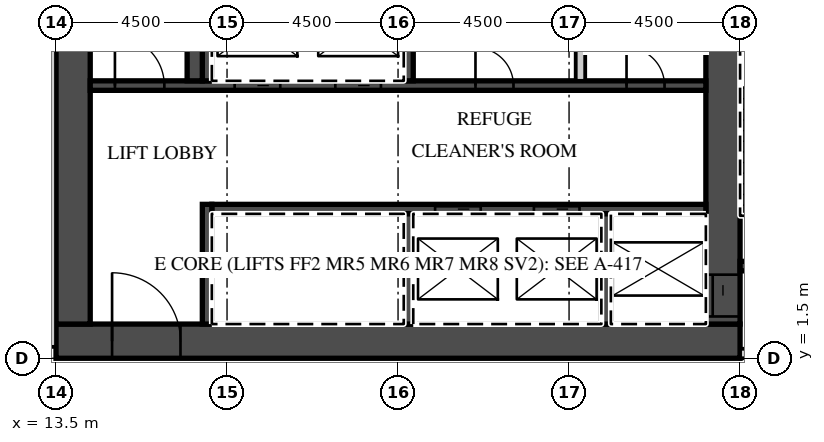
"""IFC4 building model, lengths in metres.
Left out: names, types, materials, properties, quantities, classifications, styles, units other than length and angle.
Written with IfcOpenShell. Run it as: python <this file> out.ifc"""

import sys

from ifc_helpers import new_model, si_unit, direction, frame, frame_2d, origin, place, context, subcontext, project, spatial, rectangle, extrude, element, fill, save


model = new_model("IFC4")
c1 = context("Model", 3, precision=1e-05, world=origin(), true_north=direction((0.0, 1.0)))
c2 = subcontext(c1, "Body", "Model", "MODEL_VIEW")
j1 = project(units=[si_unit("LENGTHUNIT", "METRE"), si_unit("PLANEANGLEUNIT", "RADIAN")], contexts=[c1])
p1 = place(None, origin())
s1 = spatial("IfcSite", under=j1, at=p1, CompositionType="ELEMENT")
p2 = place(p1, origin())
s2 = spatial("IfcBuilding", under=s1, at=p2, CompositionType="ELEMENT")
p3 = place(p2, frame((0.0, 0.0, 257.3)))
s3 = spatial("IfcBuildingStorey", under=s2, at=p3, CompositionType="ELEMENT", Elevation=257.3)
p4 = place(p3, frame((13.5, 1.95, 0.0), z_axis=(0.0, 0.0, 1.0), x_axis=(1.0, 0.0, 0.0)))
e1 = element("IfcWall", 1, at=p4, inside=s3, PredefinedType="SHEAR", context=c2, shape_type="SweptSolid", body=[
    extrude(rectangle(XDim=18.0, YDim=0.9, at=frame_2d((9.0, 0.0))), origin(), (0.0, 0.0, 1.0), 4.2),
])
p5 = place(p4, frame((1.475, 0.0, 0.0)))
e2 = element("IfcOpeningElement", 2, at=p5, cuts=e1, PredefinedType="OPENING", context=c2, shape_type="SweptSolid", body=[
    extrude(rectangle(XDim=1.8, YDim=2.1, at=frame_2d((0.9, 1.05))), frame((0.0, 0.46, 0.0), z_axis=(0.0, -1.0, 0.0), x_axis=(1.0, 0.0, 0.0)), (0.0, 0.0, 1.0), 0.92),
])
p6 = place(p3, frame((31.05, 2.4, 0.0), z_axis=(0.0, 0.0, 1.0), x_axis=(0.0, 1.0, 0.0)))
e3 = element("IfcWall", 3, at=p6, inside=s3, PredefinedType="SHEAR", context=c2, shape_type="SweptSolid", body=[
    extrude(rectangle(XDim=12.8, YDim=0.9, at=frame_2d((6.4, 0.0))), origin(), (0.0, 0.0, 1.0), 4.2),
])
p7 = place(p6, frame((0.2, 0.0, 0.0)))
e4 = element("IfcOpeningElement", 4, at=p7, cuts=e3, PredefinedType="OPENING", context=c2, shape_type="SweptSolid", body=[
    extrude(rectangle(XDim=1.1, YDim=2.1, at=frame_2d((0.55, 1.05))), frame((0.0, 0.46, 0.0), z_axis=(0.0, -1.0, 0.0), x_axis=(1.0, 0.0, 0.0)), (0.0, 0.0, 1.0), 0.92),
])
p8 = place(p3, frame((13.95, 2.4, 0.0), z_axis=(0.0, 0.0, 1.0), x_axis=(0.0, 1.0, 0.0)))
e5 = element("IfcWall", 5, at=p8, inside=s3, PredefinedType="SHEAR", context=c2, shape_type="SweptSolid", body=[
    extrude(rectangle(XDim=12.2, YDim=0.9, at=frame_2d((6.1, 0.0))), origin(), (0.0, 0.0, 1.0), 4.2),
])
p9 = place(p3, frame((17.6, 5.425, 0.0), z_axis=(0.0, 0.0, 1.0), x_axis=(1.0, 0.0, 0.0)))
e6 = element("IfcWall", 6, at=p9, inside=s3, PredefinedType="SHEAR", context=c2, shape_type="SweptSolid", body=[
    extrude(rectangle(XDim=13.0, YDim=0.25, at=frame_2d((6.5, 0.0))), origin(), (0.0, 0.0, 1.0), 4.2),
])
p10 = place(p9, frame((8.475, 0.0, 0.0)))
e7 = element("IfcOpeningElement", 7, at=p10, cuts=e6, PredefinedType="OPENING", context=c2, shape_type="SweptSolid", body=[
    extrude(rectangle(XDim=1.2, YDim=2.1, at=frame_2d((0.6, 1.05))), frame((0.0, 0.135, 0.0), z_axis=(0.0, -1.0, 0.0), x_axis=(1.0, 0.0, 0.0)), (0.0, 0.0, 1.0), 0.27),
])
p11 = place(p9, frame((5.875, 0.0, 0.0)))
e8 = element("IfcOpeningElement", 8, at=p11, cuts=e6, PredefinedType="OPENING", context=c2, shape_type="SweptSolid", body=[
    extrude(rectangle(XDim=1.2, YDim=2.1, at=frame_2d((0.6, 1.05))), frame((0.0, 0.135, 0.0), z_axis=(0.0, -1.0, 0.0), x_axis=(1.0, 0.0, 0.0)), (0.0, 0.0, 1.0), 0.27),
])
p12 = place(p3, frame((17.475, 2.4, 0.0), z_axis=(0.0, 0.0, 1.0), x_axis=(0.0, 1.0, 0.0)))
e9 = element("IfcWall", 9, at=p12, inside=s3, PredefinedType="SHEAR", context=c2, shape_type="SweptSolid", body=[
    extrude(rectangle(XDim=3.15, YDim=0.25, at=frame_2d((1.575, 0.0))), origin(), (0.0, 0.0, 1.0), 4.2),
])
for number, where, z_axis, x_axis in (
    (10, (27.975, 2.4, 0.0), (0.0, 0.0, 1.0), (0.0, 1.0, 0.0)),
    (11, (22.775, 2.4, 0.0), (0.0, 0.0, 1.0), (0.0, 1.0, 0.0)),
):
    element("IfcWall", number, at=place(p3, frame(where, z_axis=z_axis, x_axis=x_axis)), inside=s3, PredefinedType="SHEAR", context=c2, shape_type="SweptSolid", body=[
        extrude(rectangle(XDim=2.9, YDim=0.25, at=frame_2d((1.45, 0.0))), origin(), (0.0, 0.0, 1.0), 4.2),
    ])
p13 = place(p3, frame((14.4, 8.675, 0.0), z_axis=(0.0, 0.0, 1.0), x_axis=(1.0, 0.0, 0.0)))
e12 = element("IfcWall", 12, at=p13, inside=s3, PredefinedType="SHEAR", context=c2, shape_type="SweptSolid", body=[
    extrude(rectangle(XDim=16.2, YDim=0.25, at=frame_2d((8.1, 0.0))), origin(), (0.0, 0.0, 1.0), 4.2),
])
p14 = place(p13, frame((6.45, 0.0, 0.0)))
e13 = element("IfcOpeningElement", 13, at=p14, cuts=e12, PredefinedType="OPENING", context=c2, shape_type="SweptSolid", body=[
    extrude(rectangle(XDim=1.2, YDim=2.1, at=frame_2d((0.6, 1.05))), frame((0.0, 0.135, 0.0), z_axis=(0.0, -1.0, 0.0), x_axis=(1.0, 0.0, 0.0)), (0.0, 0.0, 1.0), 0.27),
])
p15 = place(p13, frame((3.8, 0.0, 0.0)))
e14 = element("IfcOpeningElement", 14, at=p15, cuts=e12, PredefinedType="OPENING", context=c2, shape_type="SweptSolid", body=[
    extrude(rectangle(XDim=1.2, YDim=2.1, at=frame_2d((0.6, 1.05))), frame((0.0, 0.135, 0.0), z_axis=(0.0, -1.0, 0.0), x_axis=(1.0, 0.0, 0.0)), (0.0, 0.0, 1.0), 0.27),
])
p16 = place(p13, frame((0.65, 0.0, 0.0)))
e15 = element("IfcOpeningElement", 15, at=p16, cuts=e12, PredefinedType="OPENING", context=c2, shape_type="SweptSolid", body=[
    extrude(rectangle(XDim=1.3, YDim=2.1, at=frame_2d((0.65, 1.05))), frame((0.0, 0.135, 0.0), z_axis=(0.0, -1.0, 0.0), x_axis=(1.0, 0.0, 0.0)), (0.0, 0.0, 1.0), 0.27),
])
p17 = place(p13, frame((14.113, 0.0, 0.0)))
e16 = element("IfcOpeningElement", 16, at=p17, cuts=e12, PredefinedType="OPENING", context=c2, shape_type="SweptSolid", body=[
    extrude(rectangle(XDim=1.0, YDim=2.1, at=frame_2d((0.5, 1.05))), frame((0.0, 0.135, 0.0), z_axis=(0.0, -1.0, 0.0), x_axis=(1.0, 0.0, 0.0)), (0.0, 0.0, 1.0), 0.27),
])
p18 = place(p13, frame((10.137, 0.0, 0.0)))
e17 = element("IfcOpeningElement", 17, at=p18, cuts=e12, PredefinedType="OPENING", context=c2, shape_type="SweptSolid", body=[
    extrude(rectangle(XDim=1.0, YDim=2.1, at=frame_2d((0.5, 1.05))), frame((0.0, 0.135, 0.0), z_axis=(0.0, -1.0, 0.0), x_axis=(1.0, 0.0, 0.0)), (0.0, 0.0, 1.0), 0.27),
])
for number, where, z_axis, x_axis in (
    (18, (17.475, 8.8, 0.0), (0.0, 0.0, 1.0), (0.0, 1.0, 0.0)),
    (19, (22.775, 8.8, 0.0), (0.0, 0.0, 1.0), (0.0, 1.0, 0.0)),
):
    element("IfcWall", number, at=place(p3, frame(where, z_axis=z_axis, x_axis=x_axis)), inside=s3, PredefinedType="SHEAR", context=c2, shape_type="SweptSolid", body=[
        extrude(rectangle(XDim=2.9, YDim=0.25, at=frame_2d((1.45, 0.0))), origin(), (0.0, 0.0, 1.0), 4.2),
    ])
p19 = place(p3, frame((27.3, 8.8, 0.0), z_axis=(0.0, 0.0, 1.0), x_axis=(0.0, 1.0, 0.0)))
e20 = element("IfcWall", 20, at=p19, inside=s3, PredefinedType="PARTITIONING", context=c2, shape_type="SweptSolid", body=[
    extrude(rectangle(XDim=2.9, YDim=0.25, at=frame_2d((1.45, 0.0))), origin(), (0.0, 0.0, 1.0), 4.2),
])
p20 = place(p3, frame((17.15, 8.8, 0.0), z_axis=(0.0, 0.0, 1.0), x_axis=(0.0, 1.0, 0.0)))
e21 = element("IfcWall", 21, at=p20, inside=s3, PredefinedType="SHEAR", context=c2, shape_type="SweptSolid", body=[
    extrude(rectangle(XDim=5.8, YDim=0.4, at=frame_2d((2.9, 0.0))), origin(), (0.0, 0.0, 1.0), 4.2),
])
p21 = place(p3, frame((31.5, 1.625, 0.0), z_axis=(0.0, 0.0, 1.0), x_axis=(1.0, 0.0, 0.0)))
e22 = element("IfcWall", 22, at=p21, inside=s3, PredefinedType="PARTITIONING", context=c2, shape_type="SweptSolid", body=[
    extrude(rectangle(XDim=11.04, YDim=0.25, at=frame_2d((5.52, 0.0))), origin(), (0.0, 0.0, 1.0), 4.2),
])
p22 = place(p21, frame((0.625, 0.0, 0.0)))
e23 = element("IfcOpeningElement", 23, at=p22, cuts=e22, PredefinedType="OPENING", context=c2, shape_type="SweptSolid", body=[
    extrude(rectangle(XDim=1.3, YDim=2.1, at=frame_2d((0.65, 1.05))), frame((0.0, 0.135, 0.0), z_axis=(0.0, -1.0, 0.0), x_axis=(1.0, 0.0, 0.0)), (0.0, 0.0, 1.0), 0.27),
])
p23 = place(p21, frame((3.05, 0.0, 0.0)))
e24 = element("IfcOpeningElement", 24, at=p23, cuts=e22, PredefinedType="OPENING", context=c2, shape_type="SweptSolid", body=[
    extrude(rectangle(XDim=1.1, YDim=2.1, at=frame_2d((0.55, 1.05))), frame((0.0, 0.135, 0.0), z_axis=(0.0, -1.0, 0.0), x_axis=(1.0, 0.0, 0.0)), (0.0, 0.0, 1.0), 0.27),
])
p24 = place(p3, frame((31.5, 3.925, 0.0), z_axis=(0.0, 0.0, 1.0), x_axis=(1.0, 0.0, 0.0)))
e25 = element("IfcWall", 25, at=p24, inside=s3, PredefinedType="SHEAR", context=c2, shape_type="SweptSolid", body=[
    extrude(rectangle(XDim=2.55, YDim=0.25, at=frame_2d((1.275, 0.0))), origin(), (0.0, 0.0, 1.0), 4.2),
])
p25 = place(p24, frame((0.625, 0.0, 0.0)))
e26 = element("IfcOpeningElement", 26, at=p25, cuts=e25, PredefinedType="OPENING", context=c2, shape_type="SweptSolid", body=[
    extrude(rectangle(XDim=1.3, YDim=2.1, at=frame_2d((0.65, 1.05))), frame((0.0, 0.135, 0.0), z_axis=(0.0, -1.0, 0.0), x_axis=(1.0, 0.0, 0.0)), (0.0, 0.0, 1.0), 0.27),
])
p26 = place(p3, frame((13.4, 1.8, 0.0), z_axis=(0.0, 0.0, 1.0), x_axis=(0.0, 1.0, 0.0)))
e27 = element("IfcWall", 27, at=p26, inside=s3, PredefinedType="PARTITIONING", context=c2, shape_type="SweptSolid", body=[
    extrude(rectangle(XDim=19.131, YDim=0.2, at=frame_2d((9.565, 0.0))), origin(), (0.0, 0.0, 1.0), 4.2),
])
p27 = place(p14, origin())
e28 = element("IfcDoor", 28, at=p27, inside=s3, OperationType="SLIDING_TO_LEFT", PredefinedType="DOOR", context=c2, shape_type="SweptSolid", body=[
    extrude(rectangle(XDim=1.2, YDim=2.1, at=frame_2d((0.6, 1.05))), frame((0.0, 0.025, 0.0), z_axis=(0.0, -1.0, 0.0), x_axis=(1.0, 0.0, 0.0)), (0.0, 0.0, 1.0), 0.05),
])
fill(e13, e28)
p28 = place(p15, origin())
e29 = element("IfcDoor", 29, at=p28, inside=s3, OperationType="SLIDING_TO_RIGHT", PredefinedType="DOOR", context=c2, shape_type="SweptSolid", body=[
    extrude(rectangle(XDim=1.2, YDim=2.1, at=frame_2d((0.6, 1.05))), frame((0.0, 0.025, 0.0), z_axis=(0.0, -1.0, 0.0), x_axis=(1.0, 0.0, 0.0)), (0.0, 0.0, 1.0), 0.05),
])
fill(e14, e29)
p29 = place(p10, origin())
e30 = element("IfcDoor", 30, at=p29, inside=s3, OperationType="SLIDING_TO_LEFT", PredefinedType="DOOR", context=c2, shape_type="SweptSolid", body=[
    extrude(rectangle(XDim=1.2, YDim=2.1, at=frame_2d((0.6, 1.05))), frame((0.0, 0.025, 0.0), z_axis=(0.0, -1.0, 0.0), x_axis=(1.0, 0.0, 0.0)), (0.0, 0.0, 1.0), 0.05),
])
fill(e7, e30)
p30 = place(p11, origin())
e31 = element("IfcDoor", 31, at=p30, inside=s3, OperationType="SLIDING_TO_RIGHT", PredefinedType="DOOR", context=c2, shape_type="SweptSolid", body=[
    extrude(rectangle(XDim=1.2, YDim=2.1, at=frame_2d((0.6, 1.05))), frame((0.0, 0.025, 0.0), z_axis=(0.0, -1.0, 0.0), x_axis=(1.0, 0.0, 0.0)), (0.0, 0.0, 1.0), 0.05),
])
fill(e8, e31)
p31 = place(p7, origin())
e32 = element("IfcDoor", 32, at=p31, inside=s3, OperationType="SLIDING_TO_LEFT", PredefinedType="DOOR", context=c2, shape_type="SweptSolid", body=[
    extrude(rectangle(XDim=1.1, YDim=2.1, at=frame_2d((0.55, 1.05))), frame((0.0, 0.025, 0.0), z_axis=(0.0, -1.0, 0.0), x_axis=(1.0, 0.0, 0.0)), (0.0, 0.0, 1.0), 0.05),
])
fill(e4, e32)
p32 = place(p5, origin())
e33 = element("IfcDoor", 33, at=p32, inside=s3, OperationType="DOUBLE_DOOR_DOUBLE_SWING", PredefinedType="DOOR", context=c2, shape_type="SweptSolid", body=[
    extrude(rectangle(XDim=1.8, YDim=2.1, at=frame_2d((0.9, 1.05))), frame((0.0, 0.025, 0.0), z_axis=(0.0, -1.0, 0.0), x_axis=(1.0, 0.0, 0.0)), (0.0, 0.0, 1.0), 0.05),
])
fill(e2, e33)
p33 = place(p16, origin())
e34 = element("IfcDoor", 34, at=p33, inside=s3, OperationType="SINGLE_SWING_LEFT", PredefinedType="DOOR", context=c2, shape_type="SweptSolid", body=[
    extrude(rectangle(XDim=1.3, YDim=2.1, at=frame_2d((0.65, 1.05))), frame((0.0, 0.025, 0.0), z_axis=(0.0, -1.0, 0.0), x_axis=(1.0, 0.0, 0.0)), (0.0, 0.0, 1.0), 0.05),
])
fill(e15, e34)
p34 = place(p17, origin())
e35 = element("IfcDoor", 35, at=p34, inside=s3, OperationType="SINGLE_SWING_LEFT", PredefinedType="DOOR", context=c2, shape_type="SweptSolid", body=[
    extrude(rectangle(XDim=1.0, YDim=2.1, at=frame_2d((0.5, 1.05))), frame((0.0, 0.025, 0.0), z_axis=(0.0, -1.0, 0.0), x_axis=(1.0, 0.0, 0.0)), (0.0, 0.0, 1.0), 0.05),
])
fill(e16, e35)
p35 = place(p18, origin())
e36 = element("IfcDoor", 36, at=p35, inside=s3, OperationType="SINGLE_SWING_LEFT", PredefinedType="DOOR", context=c2, shape_type="SweptSolid", body=[
    extrude(rectangle(XDim=1.0, YDim=2.1, at=frame_2d((0.5, 1.05))), frame((0.0, 0.025, 0.0), z_axis=(0.0, -1.0, 0.0), x_axis=(1.0, 0.0, 0.0)), (0.0, 0.0, 1.0), 0.05),
])
fill(e17, e36)
save(model, sys.argv[1])
